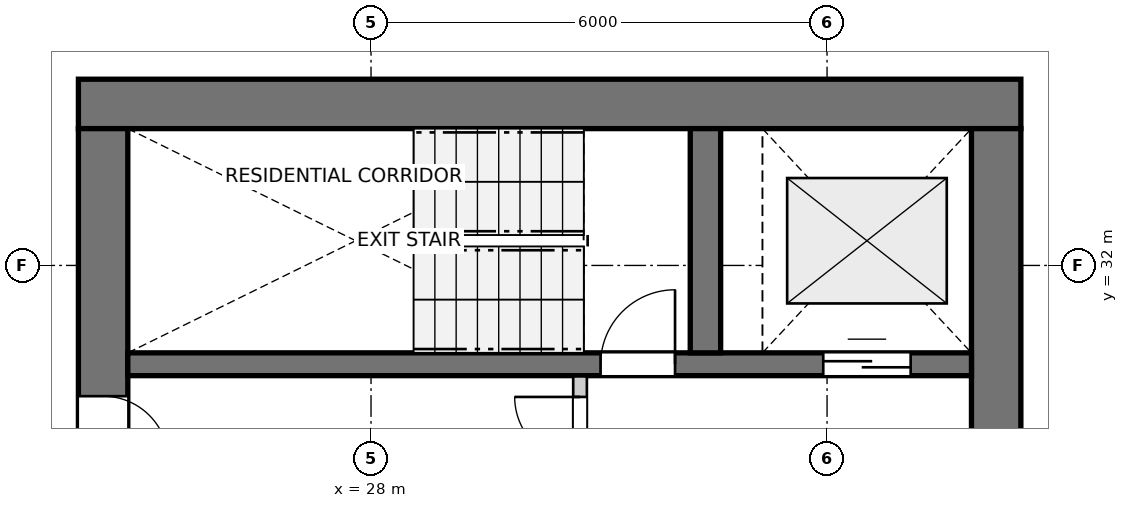
"""IFC4 building model, lengths in metres.
Left out: names, types, materials, properties, quantities, classifications, styles, units other than length and angle.
Written with IfcOpenShell. Run it as: python <this file> out.ifc"""

import sys

from ifc_helpers import new_model, si_unit, direction, frame, frame_2d, origin, place, context, subcontext, project, spatial, rectangle, extrude, source, transform, mapped, element, fill, save


model = new_model("IFC4")
c1 = context("Model", 3, precision=1e-05, world=origin(), true_north=direction((0.0, 1.0)))
c2 = subcontext(c1, "Body", "Model", "MODEL_VIEW")
j1 = project(units=[si_unit("LENGTHUNIT", "METRE"), si_unit("PLANEANGLEUNIT", "RADIAN")], contexts=[c1])
p1 = place(None, origin())
s1 = spatial("IfcSite", under=j1, at=p1, CompositionType="ELEMENT")
p2 = place(p1, origin())
s2 = spatial("IfcBuilding", under=s1, at=p2, CompositionType="ELEMENT")
p3 = place(p2, frame((0.0, 0.0, 73.6)))
s3 = spatial("IfcBuildingStorey", under=s2, at=p3, CompositionType="ELEMENT", Elevation=73.6)
p4 = place(p3, frame((36.55, 34.125, 0.0), z_axis=(0.0, 0.0, 1.0), x_axis=(-1.0, 0.0, 0.0)))
e1 = element("IfcWall", 1, at=p4, inside=s3, PredefinedType="SHEAR", context=c2, shape_type="SweptSolid", body=[
    extrude(rectangle(XDim=12.4, YDim=0.65, at=frame_2d((6.2, 0.0))), origin(), (0.0, 0.0, 1.0), 2.95),
])
p5 = place(p3, frame((24.475, 33.8, 0.0), z_axis=(0.0, 0.0, 1.0), x_axis=(0.0, -1.0, 0.0)))
e2 = element("IfcWall", 2, at=p5, inside=s3, PredefinedType="SHEAR", context=c2, shape_type="SweptSolid", body=[
    extrude(rectangle(XDim=15.6, YDim=0.65, at=frame_2d((7.8, 0.0))), origin(), (0.0, 0.0, 1.0), 2.95),
])
p6 = place(p5, frame((7.05, 0.0, 0.0)))
e3 = element("IfcOpeningElement", 3, at=p6, cuts=e2, PredefinedType="OPENING", context=c2, shape_type="SweptSolid", body=[
    extrude(rectangle(XDim=1.5, YDim=2.15, at=frame_2d((0.75, 1.075))), frame((0.0, 0.335, 0.0), z_axis=(0.0, -1.0, 0.0), x_axis=(1.0, 0.0, 0.0)), (0.0, 0.0, 1.0), 0.67),
])
p7 = place(p5, frame((3.52, 0.0, 0.0)))
e4 = element("IfcOpeningElement", 4, at=p7, cuts=e2, PredefinedType="OPENING", context=c2, shape_type="SweptSolid", body=[
    extrude(rectangle(XDim=0.86, YDim=2.05, at=frame_2d((0.43, 1.025))), frame((0.0, 0.335, 0.0), z_axis=(0.0, -1.0, 0.0), x_axis=(1.0, 0.0, 0.0)), (0.0, 0.0, 1.0), 0.67),
])
p8 = place(p5, frame((11.22, 0.0, 0.0)))
e5 = element("IfcOpeningElement", 5, at=p8, cuts=e2, PredefinedType="OPENING", context=c2, shape_type="SweptSolid", body=[
    extrude(rectangle(XDim=0.86, YDim=2.05, at=frame_2d((0.43, 1.025))), frame((0.0, 0.335, 0.0), z_axis=(0.0, -1.0, 0.0), x_axis=(1.0, 0.0, 0.0)), (0.0, 0.0, 1.0), 0.67),
])
p9 = place(p3, frame((36.225, 18.2, 0.0), z_axis=(0.0, 0.0, 1.0), x_axis=(0.0, 1.0, 0.0)))
e6 = element("IfcWall", 6, at=p9, inside=s3, PredefinedType="SHEAR", context=c2, shape_type="SweptSolid", body=[
    extrude(rectangle(XDim=15.6, YDim=0.65, at=frame_2d((7.8, 0.0))), origin(), (0.0, 0.0, 1.0), 2.95),
])
p10 = place(p9, frame((4.25, 0.0, 0.0)))
e7 = element("IfcOpeningElement", 7, at=p10, cuts=e6, PredefinedType="OPENING", context=c2, shape_type="SweptSolid", body=[
    extrude(rectangle(XDim=1.1, YDim=2.15, at=frame_2d((0.55, 1.075))), frame((0.0, 0.335, 0.0), z_axis=(0.0, -1.0, 0.0), x_axis=(1.0, 0.0, 0.0)), (0.0, 0.0, 1.0), 0.67),
])
p11 = place(p9, frame((10.25, 0.0, 0.0)))
e8 = element("IfcOpeningElement", 8, at=p11, cuts=e6, PredefinedType="OPENING", context=c2, shape_type="SweptSolid", body=[
    extrude(rectangle(XDim=1.1, YDim=2.15, at=frame_2d((0.55, 1.075))), frame((0.0, 0.335, 0.0), z_axis=(0.0, -1.0, 0.0), x_axis=(1.0, 0.0, 0.0)), (0.0, 0.0, 1.0), 0.67),
])
p12 = place(p3, frame((24.8, 30.7, 0.0), z_axis=(0.0, 0.0, 1.0), x_axis=(1.0, 0.0, 0.0)))
e9 = element("IfcWall", 9, at=p12, inside=s3, PredefinedType="SHEAR", context=c2, shape_type="SweptSolid", body=[
    extrude(rectangle(XDim=11.1, YDim=0.3, at=frame_2d((5.55, 0.0))), origin(), (0.0, 0.0, 1.0), 2.95),
])
p13 = place(p12, frame((6.22, 0.0, 0.0)))
e10 = element("IfcOpeningElement", 10, at=p13, cuts=e9, PredefinedType="OPENING", context=c2, shape_type="SweptSolid", body=[
    extrude(rectangle(XDim=0.98, YDim=2.15, at=frame_2d((0.49, 1.075))), frame((0.0, 0.16, 0.0), z_axis=(0.0, -1.0, 0.0), x_axis=(1.0, 0.0, 0.0)), (0.0, 0.0, 1.0), 0.32),
])
p14 = place(p12, frame((9.15, 0.0, 0.0)))
e11 = element("IfcOpeningElement", 11, at=p14, cuts=e9, PredefinedType="OPENING", context=c2, shape_type="SweptSolid", body=[
    extrude(rectangle(XDim=1.15, YDim=2.15, at=frame_2d((0.575, 1.075))), frame((0.0, 0.16, 0.0), z_axis=(0.0, -1.0, 0.0), x_axis=(1.0, 0.0, 0.0)), (0.0, 0.0, 1.0), 0.32),
])
p15 = place(p3, frame((32.4, 30.85, 0.0), z_axis=(0.0, 0.0, 1.0), x_axis=(0.0, 1.0, 0.0)))
e12 = element("IfcWall", 12, at=p15, inside=s3, PredefinedType="SHEAR", context=c2, shape_type="SweptSolid", body=[
    extrude(rectangle(XDim=2.95, YDim=0.4, at=frame_2d((1.475, 0.0))), origin(), (0.0, 0.0, 1.0), 2.95),
])
p16 = place(p3, frame((30.75, 27.43, 0.0), z_axis=(0.0, 0.0, 1.0), x_axis=(0.0, 1.0, 0.0)))
e13 = element("IfcWall", 13, at=p16, inside=s3, PredefinedType="PARTITIONING", context=c2, shape_type="SweptSolid", body=[
    extrude(rectangle(XDim=3.11, YDim=0.18, at=frame_2d((1.555, 0.0))), origin(), (0.0, 0.0, 1.0), 2.95),
])
p17 = place(p16, frame((1.98, 0.0, 0.0)))
e14 = element("IfcOpeningElement", 14, at=p17, cuts=e13, PredefinedType="OPENING", context=c2, shape_type="SweptSolid", body=[
    extrude(rectangle(XDim=0.86, YDim=2.05, at=frame_2d((0.43, 1.025))), frame((0.0, 0.1, 0.0), z_axis=(0.0, -1.0, 0.0), x_axis=(1.0, 0.0, 0.0)), (0.0, 0.0, 1.0), 0.2),
])
m1 = source(origin(), c2, "Body", "SweptSolid", [
    extrude(rectangle(XDim=0.98, YDim=2.15, at=frame_2d((0.49, 1.075))), frame((0.0, 0.025, 0.0), z_axis=(0.0, -1.0, 0.0), x_axis=(1.0, 0.0, 0.0)), (0.0, 0.0, 1.0), 0.05),
])
p18 = place(p13, origin())
e15 = element("IfcDoor", 15, at=p18, inside=s3, OperationType="SINGLE_SWING_RIGHT", PredefinedType="DOOR", context=c2, shape_type="MappedRepresentation", body=[
    mapped(m1, transform((0.0, 0.0, 0.0), x_axis=(1.0, 0.0, 0.0), y_axis=(0.0, 1.0, 0.0), z_axis=(0.0, 0.0, 1.0), scale=1.0)),
])
fill(e10, e15)
m2 = source(origin(), c2, "Body", "SweptSolid", [
    extrude(rectangle(XDim=1.15, YDim=2.15, at=frame_2d((0.575, 1.075))), frame((0.0, 0.025, 0.0), z_axis=(0.0, -1.0, 0.0), x_axis=(1.0, 0.0, 0.0)), (0.0, 0.0, 1.0), 0.05),
])
p19 = place(p14, origin())
e16 = element("IfcDoor", 16, at=p19, inside=s3, OperationType="DOUBLE_DOOR_SLIDING", PredefinedType="DOOR", context=c2, shape_type="MappedRepresentation", body=[
    mapped(m2, transform((0.0, 0.0, 0.0), x_axis=(1.0, 0.0, 0.0), y_axis=(0.0, 1.0, 0.0), z_axis=(0.0, 0.0, 1.0), scale=1.0)),
])
fill(e11, e16)
m3 = source(origin(), c2, "Body", "SweptSolid", [
    extrude(rectangle(XDim=0.86, YDim=2.05, at=frame_2d((0.43, 1.025))), frame((0.0, 0.025, 0.0), z_axis=(0.0, -1.0, 0.0), x_axis=(1.0, 0.0, 0.0)), (0.0, 0.0, 1.0), 0.05),
])
p20 = place(p7, origin())
e17 = element("IfcDoor", 17, at=p20, inside=s3, OperationType="SINGLE_SWING_RIGHT", PredefinedType="DOOR", context=c2, shape_type="MappedRepresentation", body=[
    mapped(m3, transform((0.0, 0.0, 0.0), x_axis=(1.0, 0.0, 0.0), y_axis=(0.0, 1.0, 0.0), z_axis=(0.0, 0.0, 1.0), scale=1.0)),
])
fill(e4, e17)
p21 = place(p17, origin())
e18 = element("IfcDoor", 18, at=p21, inside=s3, OperationType="SINGLE_SWING_RIGHT", PredefinedType="DOOR", context=c2, shape_type="MappedRepresentation", body=[
    mapped(m3, transform((0.0, 0.0, 0.0), x_axis=(1.0, 0.0, 0.0), y_axis=(0.0, 1.0, 0.0), z_axis=(0.0, 0.0, 1.0), scale=1.0)),
])
fill(e14, e18)
save(model, sys.argv[1])
